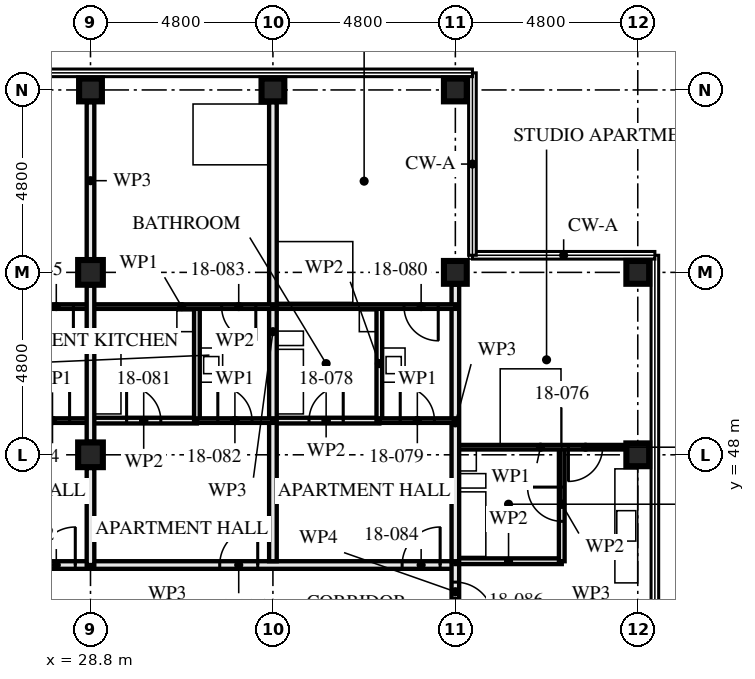
"""IFC4 building model, lengths in metres.
Left out: names, types, materials, properties, quantities, classifications, styles, units other than length and angle.
Written with IfcOpenShell. Run it as: python <this file> out.ifc"""

import sys

from ifc_helpers import new_model, si_unit, direction, frame, frame_2d, origin, origin_2d, place, context, subcontext, project, spatial, rectangle, hollow_rectangle, extrude, element, fill, save


model = new_model("IFC4")
c1 = context("Model", 3, precision=1e-05, world=origin(), true_north=direction((0.0, 1.0)))
c2 = subcontext(c1, "Body", "Model", "MODEL_VIEW")
j1 = project(units=[si_unit("LENGTHUNIT", "METRE"), si_unit("PLANEANGLEUNIT", "RADIAN")], contexts=[c1])
p1 = place(None, origin())
s1 = spatial("IfcSite", under=j1, at=p1, CompositionType="ELEMENT")
p2 = place(p1, origin())
s2 = spatial("IfcBuilding", under=s1, at=p2, CompositionType="ELEMENT")
p3 = place(p2, frame((0.0, 0.0, 69.0)))
s3 = spatial("IfcBuildingStorey", under=s2, at=p3, CompositionType="ELEMENT", Elevation=69.0)
for number, where, z_axis, x_axis in (
    (1, (28.8, 48.0, 0.0), (0.0, 0.0, 1.0), (1.0, 0.0, 0.0)),
    (2, (28.8, 52.8, 0.0), (0.0, 0.0, 1.0), (1.0, 0.0, 0.0)),
):
    element("IfcColumn", number, at=place(p3, frame(where, z_axis=z_axis, x_axis=x_axis)), inside=s3, PredefinedType="COLUMN", context=c2, shape_type="SweptSolid", body=[
        extrude(hollow_rectangle(XDim=0.65, YDim=0.65, WallThickness=0.05, at=origin_2d()), origin(), (0.0, 0.0, 1.0), 3.5),
    ])
for number, where, z_axis, x_axis in (
    (3, (28.8, 57.6, 0.0), (0.0, 0.0, 1.0), (0.0, 1.0, 0.0)),
    (4, (33.6, 57.6, 0.0), (0.0, 0.0, 1.0), (0.0, 1.0, 0.0)),
    (5, (38.4, 52.8, 0.0), (0.0, 0.0, 1.0), (0.0, 1.0, 0.0)),
    (6, (38.4, 57.6, 0.0), (0.0, 0.0, 1.0), (0.0, 1.0, 0.0)),
    (7, (43.2, 48.0, 0.0), (0.0, 0.0, 1.0), (1.0, 0.0, 0.0)),
    (8, (43.2, 52.8, 0.0), (0.0, 0.0, 1.0), (0.0, 1.0, 0.0)),
):
    element("IfcColumn", number, at=place(p3, frame(where, z_axis=z_axis, x_axis=x_axis)), inside=s3, PredefinedType="COLUMN", context=c2, shape_type="SweptSolid", body=[
        extrude(hollow_rectangle(XDim=0.6, YDim=0.6, WallThickness=0.08, at=origin_2d()), origin(), (0.0, 0.0, 1.0), 3.5),
    ])
p4 = place(p3, frame((28.8, 48.9, 0.0), z_axis=(0.0, 0.0, 1.0), x_axis=(-1.0, 0.0, 0.0)))
e9 = element("IfcWall", 9, at=p4, inside=s3, PredefinedType="PARTITIONING", context=c2, shape_type="SweptSolid", body=[
    extrude(rectangle(XDim=2.0, YDim=0.12, at=frame_2d((1.0, 0.0))), origin(), (0.0, 0.0, 1.0), 3.33),
])
p5 = place(p4, frame((0.55, 0.0, 0.0)))
e10 = element("IfcOpeningElement", 10, at=p5, cuts=e9, PredefinedType="OPENING", context=c2, shape_type="SweptSolid", body=[
    extrude(rectangle(XDim=0.9, YDim=2.1, at=frame_2d((0.45, 1.05))), frame((0.0, 0.071, 0.0), z_axis=(0.0, -1.0, 0.0), x_axis=(1.0, 0.0, 0.0)), (0.0, 0.0, 1.0), 0.141),
])
p6 = place(p3, frame((28.8, 51.9, 0.0), z_axis=(0.0, 0.0, 1.0), x_axis=(-1.0, 0.0, 0.0)))
e11 = element("IfcWall", 11, at=p6, inside=s3, PredefinedType="PARTITIONING", context=c2, shape_type="SweptSolid", body=[
    extrude(rectangle(XDim=4.8, YDim=0.12, at=frame_2d((2.4, 0.0))), origin(), (0.0, 0.0, 1.0), 3.33),
])
p7 = place(p6, frame((0.45, 0.0, 0.0)))
e12 = element("IfcOpeningElement", 12, at=p7, cuts=e11, PredefinedType="OPENING", context=c2, shape_type="SweptSolid", body=[
    extrude(rectangle(XDim=0.9, YDim=2.1, at=frame_2d((0.45, 1.05))), frame((0.0, 0.071, 0.0), z_axis=(0.0, -1.0, 0.0), x_axis=(1.0, 0.0, 0.0)), (0.0, 0.0, 1.0), 0.141),
])
p8 = place(p3, frame((28.8, 45.1, 0.0), z_axis=(0.0, 0.0, 1.0), x_axis=(-1.0, 0.0, 0.0)))
e13 = element("IfcWall", 13, at=p8, inside=s3, PredefinedType="PARTITIONING", context=c2, shape_type="SweptSolid", body=[
    extrude(rectangle(XDim=14.4, YDim=0.2, at=frame_2d((7.2, 0.0))), origin(), (0.0, 0.0, 1.0), 3.33),
])
p9 = place(p8, frame((0.4, 0.0, 0.0)))
e14 = element("IfcOpeningElement", 14, at=p9, cuts=e13, PredefinedType="OPENING", context=c2, shape_type="SweptSolid", body=[
    extrude(rectangle(XDim=1.0, YDim=2.1, at=frame_2d((0.5, 1.05))), frame((0.0, 0.111, 0.0), z_axis=(0.0, -1.0, 0.0), x_axis=(1.0, 0.0, 0.0)), (0.0, 0.0, 1.0), 0.221),
])
p10 = place(p8, frame((5.2, 0.0, 0.0)))
e15 = element("IfcOpeningElement", 15, at=p10, cuts=e13, PredefinedType="OPENING", context=c2, shape_type="SweptSolid", body=[
    extrude(rectangle(XDim=1.0, YDim=2.1, at=frame_2d((0.5, 1.05))), frame((0.0, 0.111, 0.0), z_axis=(0.0, -1.0, 0.0), x_axis=(1.0, 0.0, 0.0)), (0.0, 0.0, 1.0), 0.221),
])
p11 = place(p8, frame((10.0, 0.0, 0.0)))
e16 = element("IfcOpeningElement", 16, at=p11, cuts=e13, PredefinedType="OPENING", context=c2, shape_type="SweptSolid", body=[
    extrude(rectangle(XDim=1.0, YDim=2.1, at=frame_2d((0.5, 1.05))), frame((0.0, 0.111, 0.0), z_axis=(0.0, -1.0, 0.0), x_axis=(1.0, 0.0, 0.0)), (0.0, 0.0, 1.0), 0.221),
])
p12 = place(p3, frame((41.2, 48.2, 0.0), z_axis=(0.0, 0.0, 1.0), x_axis=(0.0, -1.0, 0.0)))
e17 = element("IfcWall", 17, at=p12, inside=s3, PredefinedType="PARTITIONING", context=c2, shape_type="SweptSolid", body=[
    extrude(rectangle(XDim=3.0, YDim=0.15, at=frame_2d((1.5, 0.0))), origin(), (0.0, 0.0, 1.0), 2.55),
])
p13 = place(p12, frame((1.05, 0.0, 0.0)))
e18 = element("IfcOpeningElement", 18, at=p13, cuts=e17, PredefinedType="OPENING", context=c2, shape_type="SweptSolid", body=[
    extrude(rectangle(XDim=0.9, YDim=2.1, at=frame_2d((0.45, 1.05))), frame((0.0, 0.085, 0.0), z_axis=(0.0, -1.0, 0.0), x_axis=(1.0, 0.0, 0.0)), (0.0, 0.0, 1.0), 0.171),
])
p14 = place(p3, frame((41.2, 45.2, 0.0), z_axis=(0.0, 0.0, 1.0), x_axis=(-1.0, 0.0, 0.0)))
e19 = element("IfcWall", 19, at=p14, inside=s3, PredefinedType="PARTITIONING", context=c2, shape_type="SweptSolid", body=[
    extrude(rectangle(XDim=2.8, YDim=0.15, at=frame_2d((1.4, 0.0))), origin(), (0.0, 0.0, 1.0), 3.33),
])
p15 = place(p3, frame((42.88, 48.2, 0.0), z_axis=(0.0, 0.0, 1.0), x_axis=(-1.0, 0.0, 0.0)))
e20 = element("IfcWall", 20, at=p15, inside=s3, PredefinedType="PARTITIONING", context=c2, shape_type="SweptSolid", body=[
    extrude(rectangle(XDim=4.48, YDim=0.12, at=frame_2d((2.24, 0.0))), origin(), (0.0, 0.0, 1.0), 3.33),
])
p16 = place(p15, frame((0.605, 0.0, 0.0)))
e21 = element("IfcOpeningElement", 21, at=p16, cuts=e20, PredefinedType="OPENING", context=c2, shape_type="SweptSolid", body=[
    extrude(rectangle(XDim=0.9, YDim=2.1, at=frame_2d((0.45, 1.05))), frame((0.0, 0.071, 0.0), z_axis=(0.0, -1.0, 0.0), x_axis=(1.0, 0.0, 0.0)), (0.0, 0.0, 1.0), 0.141),
])
p17 = place(p3, frame((38.4, 52.48, 0.0), z_axis=(0.0, 0.0, 1.0), x_axis=(0.0, -1.0, 0.0)))
e22 = element("IfcWall", 22, at=p17, inside=s3, PredefinedType="PARTITIONING", context=c2, shape_type="SweptSolid", body=[
    extrude(rectangle(XDim=7.28, YDim=0.2, at=frame_2d((3.64, 0.0))), origin(), (0.0, 0.0, 1.0), 2.55),
])
p18 = place(p3, frame((36.4, 51.9, 0.0), z_axis=(0.0, 0.0, 1.0), x_axis=(0.0, -1.0, 0.0)))
e23 = element("IfcWall", 23, at=p18, inside=s3, PredefinedType="PARTITIONING", context=c2, shape_type="SweptSolid", body=[
    extrude(rectangle(XDim=3.0, YDim=0.15, at=frame_2d((1.5, 0.0))), origin(), (0.0, 0.0, 1.0), 3.33),
])
p19 = place(p3, frame((36.4, 48.9, 0.0), z_axis=(0.0, 0.0, 1.0), x_axis=(-1.0, 0.0, 0.0)))
e24 = element("IfcWall", 24, at=p19, inside=s3, PredefinedType="PARTITIONING", context=c2, shape_type="SweptSolid", body=[
    extrude(rectangle(XDim=2.8, YDim=0.15, at=frame_2d((1.4, 0.0))), origin(), (0.0, 0.0, 1.0), 3.33),
])
p20 = place(p19, frame((0.95, 0.0, 0.0)))
e25 = element("IfcOpeningElement", 25, at=p20, cuts=e24, PredefinedType="OPENING", context=c2, shape_type="SweptSolid", body=[
    extrude(rectangle(XDim=0.9, YDim=2.1, at=frame_2d((0.45, 1.05))), frame((0.0, 0.085, 0.0), z_axis=(0.0, -1.0, 0.0), x_axis=(1.0, 0.0, 0.0)), (0.0, 0.0, 1.0), 0.171),
])
p21 = place(p3, frame((38.4, 48.9, 0.0), z_axis=(0.0, 0.0, 1.0), x_axis=(-1.0, 0.0, 0.0)))
e26 = element("IfcWall", 26, at=p21, inside=s3, PredefinedType="PARTITIONING", context=c2, shape_type="SweptSolid", body=[
    extrude(rectangle(XDim=2.0, YDim=0.12, at=frame_2d((1.0, 0.0))), origin(), (0.0, 0.0, 1.0), 3.33),
])
p22 = place(p21, frame((0.55, 0.0, 0.0)))
e27 = element("IfcOpeningElement", 27, at=p22, cuts=e26, PredefinedType="OPENING", context=c2, shape_type="SweptSolid", body=[
    extrude(rectangle(XDim=0.9, YDim=2.1, at=frame_2d((0.45, 1.05))), frame((0.0, 0.071, 0.0), z_axis=(0.0, -1.0, 0.0), x_axis=(1.0, 0.0, 0.0)), (0.0, 0.0, 1.0), 0.141),
])
p23 = place(p3, frame((38.4, 51.9, 0.0), z_axis=(0.0, 0.0, 1.0), x_axis=(-1.0, 0.0, 0.0)))
e28 = element("IfcWall", 28, at=p23, inside=s3, PredefinedType="PARTITIONING", context=c2, shape_type="SweptSolid", body=[
    extrude(rectangle(XDim=4.8, YDim=0.12, at=frame_2d((2.4, 0.0))), origin(), (0.0, 0.0, 1.0), 3.33),
])
p24 = place(p23, frame((0.45, 0.0, 0.0)))
e29 = element("IfcOpeningElement", 29, at=p24, cuts=e28, PredefinedType="OPENING", context=c2, shape_type="SweptSolid", body=[
    extrude(rectangle(XDim=0.9, YDim=2.1, at=frame_2d((0.45, 1.05))), frame((0.0, 0.071, 0.0), z_axis=(0.0, -1.0, 0.0), x_axis=(1.0, 0.0, 0.0)), (0.0, 0.0, 1.0), 0.141),
])
p25 = place(p3, frame((33.6, 57.28, 0.0), z_axis=(0.0, 0.0, 1.0), x_axis=(0.0, -1.0, 0.0)))
e30 = element("IfcWall", 30, at=p25, inside=s3, PredefinedType="PARTITIONING", context=c2, shape_type="SweptSolid", body=[
    extrude(rectangle(XDim=12.08, YDim=0.2, at=frame_2d((6.04, 0.0))), origin(), (0.0, 0.0, 1.0), 2.55),
])
p26 = place(p3, frame((31.6, 51.9, 0.0), z_axis=(0.0, 0.0, 1.0), x_axis=(0.0, -1.0, 0.0)))
e31 = element("IfcWall", 31, at=p26, inside=s3, PredefinedType="PARTITIONING", context=c2, shape_type="SweptSolid", body=[
    extrude(rectangle(XDim=3.0, YDim=0.15, at=frame_2d((1.5, 0.0))), origin(), (0.0, 0.0, 1.0), 3.33),
])
p27 = place(p3, frame((31.6, 48.9, 0.0), z_axis=(0.0, 0.0, 1.0), x_axis=(-1.0, 0.0, 0.0)))
e32 = element("IfcWall", 32, at=p27, inside=s3, PredefinedType="PARTITIONING", context=c2, shape_type="SweptSolid", body=[
    extrude(rectangle(XDim=2.8, YDim=0.15, at=frame_2d((1.4, 0.0))), origin(), (0.0, 0.0, 1.0), 3.33),
])
p28 = place(p27, frame((0.95, 0.0, 0.0)))
e33 = element("IfcOpeningElement", 33, at=p28, cuts=e32, PredefinedType="OPENING", context=c2, shape_type="SweptSolid", body=[
    extrude(rectangle(XDim=0.9, YDim=2.1, at=frame_2d((0.45, 1.05))), frame((0.0, 0.085, 0.0), z_axis=(0.0, -1.0, 0.0), x_axis=(1.0, 0.0, 0.0)), (0.0, 0.0, 1.0), 0.171),
])
p29 = place(p3, frame((33.6, 48.9, 0.0), z_axis=(0.0, 0.0, 1.0), x_axis=(-1.0, 0.0, 0.0)))
e34 = element("IfcWall", 34, at=p29, inside=s3, PredefinedType="PARTITIONING", context=c2, shape_type="SweptSolid", body=[
    extrude(rectangle(XDim=2.0, YDim=0.12, at=frame_2d((1.0, 0.0))), origin(), (0.0, 0.0, 1.0), 3.33),
])
p30 = place(p29, frame((0.55, 0.0, 0.0)))
e35 = element("IfcOpeningElement", 35, at=p30, cuts=e34, PredefinedType="OPENING", context=c2, shape_type="SweptSolid", body=[
    extrude(rectangle(XDim=0.9, YDim=2.1, at=frame_2d((0.45, 1.05))), frame((0.0, 0.071, 0.0), z_axis=(0.0, -1.0, 0.0), x_axis=(1.0, 0.0, 0.0)), (0.0, 0.0, 1.0), 0.141),
])
p31 = place(p3, frame((33.6, 51.9, 0.0), z_axis=(0.0, 0.0, 1.0), x_axis=(-1.0, 0.0, 0.0)))
e36 = element("IfcWall", 36, at=p31, inside=s3, PredefinedType="PARTITIONING", context=c2, shape_type="SweptSolid", body=[
    extrude(rectangle(XDim=4.8, YDim=0.12, at=frame_2d((2.4, 0.0))), origin(), (0.0, 0.0, 1.0), 3.33),
])
p32 = place(p31, frame((0.45, 0.0, 0.0)))
e37 = element("IfcOpeningElement", 37, at=p32, cuts=e36, PredefinedType="OPENING", context=c2, shape_type="SweptSolid", body=[
    extrude(rectangle(XDim=0.9, YDim=2.1, at=frame_2d((0.45, 1.05))), frame((0.0, 0.071, 0.0), z_axis=(0.0, -1.0, 0.0), x_axis=(1.0, 0.0, 0.0)), (0.0, 0.0, 1.0), 0.141),
])
p33 = place(p3, frame((38.4, 45.1, 0.0), z_axis=(0.0, 0.0, 1.0), x_axis=(-1.0, 0.0, 0.0)))
e38 = element("IfcWall", 38, at=p33, inside=s3, PredefinedType="PARTITIONING", context=c2, shape_type="SweptSolid", body=[
    extrude(rectangle(XDim=9.6, YDim=0.2, at=frame_2d((4.8, 0.0))), origin(), (0.0, 0.0, 1.0), 3.33),
])
p34 = place(p33, frame((0.4, 0.0, 0.0)))
e39 = element("IfcOpeningElement", 39, at=p34, cuts=e38, PredefinedType="OPENING", context=c2, shape_type="SweptSolid", body=[
    extrude(rectangle(XDim=1.0, YDim=2.1, at=frame_2d((0.5, 1.05))), frame((0.0, 0.111, 0.0), z_axis=(0.0, -1.0, 0.0), x_axis=(1.0, 0.0, 0.0)), (0.0, 0.0, 1.0), 0.221),
])
p35 = place(p33, frame((5.2, 0.0, 0.0)))
e40 = element("IfcOpeningElement", 40, at=p35, cuts=e38, PredefinedType="OPENING", context=c2, shape_type="SweptSolid", body=[
    extrude(rectangle(XDim=1.0, YDim=2.1, at=frame_2d((0.5, 1.05))), frame((0.0, 0.111, 0.0), z_axis=(0.0, -1.0, 0.0), x_axis=(1.0, 0.0, 0.0)), (0.0, 0.0, 1.0), 0.221),
])
p36 = place(p3, frame((38.4, 45.2, 0.0), z_axis=(0.0, 0.0, 1.0), x_axis=(0.0, -1.0, 0.0)))
e41 = element("IfcWall", 41, at=p36, inside=s3, PredefinedType="PARTITIONING", context=c2, shape_type="SweptSolid", body=[
    extrude(rectangle(XDim=1.605, YDim=0.2, at=frame_2d((0.802, 0.0))), origin(), (0.0, 0.0, 1.0), 3.33),
])
p37 = place(p36, frame((0.55, 0.0, 0.0)))
e42 = element("IfcOpeningElement", 42, at=p37, cuts=e41, PredefinedType="OPENING", context=c2, shape_type="SweptSolid", body=[
    extrude(rectangle(XDim=1.0, YDim=2.1, at=frame_2d((0.5, 1.05))), frame((0.0, 0.111, 0.0), z_axis=(0.0, -1.0, 0.0), x_axis=(1.0, 0.0, 0.0)), (0.0, 0.0, 1.0), 0.221),
])
p38 = place(p3, frame((28.8, 45.1, 0.0), z_axis=(0.0, 0.0, 1.0), x_axis=(0.0, 1.0, 0.0)))
e43 = element("IfcWall", 43, at=p38, inside=s3, PredefinedType="PARTITIONING", context=c2, shape_type="SweptSolid", body=[
    extrude(rectangle(XDim=2.555, YDim=0.2, at=frame_2d((1.277, 0.0))), origin(), (0.0, 0.0, 1.0), 2.32),
])
p39 = place(p3, frame((28.8, 48.345, 0.0), z_axis=(0.0, 0.0, 1.0), x_axis=(0.0, 1.0, 0.0)))
e44 = element("IfcWall", 44, at=p39, inside=s3, PredefinedType="PARTITIONING", context=c2, shape_type="SweptSolid", body=[
    extrude(rectangle(XDim=4.11, YDim=0.2, at=frame_2d((2.055, 0.0))), origin(), (0.0, 0.0, 1.0), 2.32),
])
p40 = place(p3, frame((28.8, 53.145, 0.0), z_axis=(0.0, 0.0, 1.0), x_axis=(0.0, 1.0, 0.0)))
e45 = element("IfcWall", 45, at=p40, inside=s3, PredefinedType="PARTITIONING", context=c2, shape_type="SweptSolid", body=[
    extrude(rectangle(XDim=4.135, YDim=0.2, at=frame_2d((2.067, 0.0))), origin(), (0.0, 0.0, 1.0), 2.32),
])
p41 = place(p5, frame((0.9, 0.0, 0.0), z_axis=(0.0, 0.0, 1.0), x_axis=(-1.0, 0.0, 0.0)))
e46 = element("IfcDoor", 46, at=p41, inside=s3, OperationType="SINGLE_SWING_LEFT", PredefinedType="DOOR", context=c2, shape_type="SweptSolid", body=[
    extrude(rectangle(XDim=0.9, YDim=2.1, at=frame_2d((0.45, 1.05))), frame((0.0, 0.022, 0.0), z_axis=(0.0, -1.0, 0.0), x_axis=(1.0, 0.0, 0.0)), (0.0, 0.0, 1.0), 0.044),
])
fill(e10, e46)
p42 = place(p7, origin())
e47 = element("IfcDoor", 47, at=p42, inside=s3, OperationType="SINGLE_SWING_RIGHT", PredefinedType="DOOR", context=c2, shape_type="SweptSolid", body=[
    extrude(rectangle(XDim=0.9, YDim=2.1, at=frame_2d((0.45, 1.05))), frame((0.0, 0.022, 0.0), z_axis=(0.0, -1.0, 0.0), x_axis=(1.0, 0.0, 0.0)), (0.0, 0.0, 1.0), 0.044),
])
fill(e12, e47)
p43 = place(p9, frame((1.0, 0.0, 0.0), z_axis=(0.0, 0.0, 1.0), x_axis=(-1.0, 0.0, 0.0)))
e48 = element("IfcDoor", 48, at=p43, inside=s3, OperationType="SINGLE_SWING_LEFT", PredefinedType="DOOR", context=c2, shape_type="SweptSolid", body=[
    extrude(rectangle(XDim=1.0, YDim=2.1, at=frame_2d((0.5, 1.05))), frame((0.0, 0.027, 0.0), z_axis=(0.0, -1.0, 0.0), x_axis=(1.0, 0.0, 0.0)), (0.0, 0.0, 1.0), 0.054),
])
fill(e14, e48)
p44 = place(p13, frame((0.9, 0.0, 0.0), z_axis=(0.0, 0.0, 1.0), x_axis=(-1.0, 0.0, 0.0)))
e49 = element("IfcDoor", 49, at=p44, inside=s3, OperationType="SINGLE_SWING_LEFT", PredefinedType="DOOR", context=c2, shape_type="SweptSolid", body=[
    extrude(rectangle(XDim=0.9, YDim=2.1, at=frame_2d((0.45, 1.05))), frame((0.0, 0.022, 0.0), z_axis=(0.0, -1.0, 0.0), x_axis=(1.0, 0.0, 0.0)), (0.0, 0.0, 1.0), 0.044),
])
fill(e18, e49)
p45 = place(p16, origin())
e50 = element("IfcDoor", 50, at=p45, inside=s3, OperationType="SINGLE_SWING_LEFT", PredefinedType="DOOR", context=c2, shape_type="SweptSolid", body=[
    extrude(rectangle(XDim=0.9, YDim=2.1, at=frame_2d((0.45, 1.05))), frame((0.0, 0.022, 0.0), z_axis=(0.0, -1.0, 0.0), x_axis=(1.0, 0.0, 0.0)), (0.0, 0.0, 1.0), 0.044),
])
fill(e21, e50)
p46 = place(p20, frame((0.9, 0.0, 0.0), z_axis=(0.0, 0.0, 1.0), x_axis=(-1.0, 0.0, 0.0)))
e51 = element("IfcDoor", 51, at=p46, inside=s3, OperationType="SINGLE_SWING_LEFT", PredefinedType="DOOR", context=c2, shape_type="SweptSolid", body=[
    extrude(rectangle(XDim=0.9, YDim=2.1, at=frame_2d((0.45, 1.05))), frame((0.0, 0.022, 0.0), z_axis=(0.0, -1.0, 0.0), x_axis=(1.0, 0.0, 0.0)), (0.0, 0.0, 1.0), 0.044),
])
fill(e25, e51)
p47 = place(p22, frame((0.9, 0.0, 0.0), z_axis=(0.0, 0.0, 1.0), x_axis=(-1.0, 0.0, 0.0)))
e52 = element("IfcDoor", 52, at=p47, inside=s3, OperationType="SINGLE_SWING_RIGHT", PredefinedType="DOOR", context=c2, shape_type="SweptSolid", body=[
    extrude(rectangle(XDim=0.9, YDim=2.1, at=frame_2d((0.45, 1.05))), frame((0.0, 0.022, 0.0), z_axis=(0.0, -1.0, 0.0), x_axis=(1.0, 0.0, 0.0)), (0.0, 0.0, 1.0), 0.044),
])
fill(e27, e52)
p48 = place(p24, origin())
e53 = element("IfcDoor", 53, at=p48, inside=s3, OperationType="SINGLE_SWING_RIGHT", PredefinedType="DOOR", context=c2, shape_type="SweptSolid", body=[
    extrude(rectangle(XDim=0.9, YDim=2.1, at=frame_2d((0.45, 1.05))), frame((0.0, 0.022, 0.0), z_axis=(0.0, -1.0, 0.0), x_axis=(1.0, 0.0, 0.0)), (0.0, 0.0, 1.0), 0.044),
])
fill(e29, e53)
p49 = place(p28, frame((0.9, 0.0, 0.0), z_axis=(0.0, 0.0, 1.0), x_axis=(-1.0, 0.0, 0.0)))
e54 = element("IfcDoor", 54, at=p49, inside=s3, OperationType="SINGLE_SWING_RIGHT", PredefinedType="DOOR", context=c2, shape_type="SweptSolid", body=[
    extrude(rectangle(XDim=0.9, YDim=2.1, at=frame_2d((0.45, 1.05))), frame((0.0, 0.022, 0.0), z_axis=(0.0, -1.0, 0.0), x_axis=(1.0, 0.0, 0.0)), (0.0, 0.0, 1.0), 0.044),
])
fill(e33, e54)
p50 = place(p30, frame((0.9, 0.0, 0.0), z_axis=(0.0, 0.0, 1.0), x_axis=(-1.0, 0.0, 0.0)))
e55 = element("IfcDoor", 55, at=p50, inside=s3, OperationType="SINGLE_SWING_RIGHT", PredefinedType="DOOR", context=c2, shape_type="SweptSolid", body=[
    extrude(rectangle(XDim=0.9, YDim=2.1, at=frame_2d((0.45, 1.05))), frame((0.0, 0.022, 0.0), z_axis=(0.0, -1.0, 0.0), x_axis=(1.0, 0.0, 0.0)), (0.0, 0.0, 1.0), 0.044),
])
fill(e35, e55)
p51 = place(p32, origin())
e56 = element("IfcDoor", 56, at=p51, inside=s3, OperationType="SINGLE_SWING_RIGHT", PredefinedType="DOOR", context=c2, shape_type="SweptSolid", body=[
    extrude(rectangle(XDim=0.9, YDim=2.1, at=frame_2d((0.45, 1.05))), frame((0.0, 0.022, 0.0), z_axis=(0.0, -1.0, 0.0), x_axis=(1.0, 0.0, 0.0)), (0.0, 0.0, 1.0), 0.044),
])
fill(e37, e56)
p52 = place(p34, frame((1.0, 0.0, 0.0), z_axis=(0.0, 0.0, 1.0), x_axis=(-1.0, 0.0, 0.0)))
e57 = element("IfcDoor", 57, at=p52, inside=s3, OperationType="SINGLE_SWING_LEFT", PredefinedType="DOOR", context=c2, shape_type="SweptSolid", body=[
    extrude(rectangle(XDim=1.0, YDim=2.1, at=frame_2d((0.5, 1.05))), frame((0.0, 0.027, 0.0), z_axis=(0.0, -1.0, 0.0), x_axis=(1.0, 0.0, 0.0)), (0.0, 0.0, 1.0), 0.054),
])
fill(e39, e57)
p53 = place(p35, frame((1.0, 0.0, 0.0), z_axis=(0.0, 0.0, 1.0), x_axis=(-1.0, 0.0, 0.0)))
e58 = element("IfcDoor", 58, at=p53, inside=s3, OperationType="SINGLE_SWING_LEFT", PredefinedType="DOOR", context=c2, shape_type="SweptSolid", body=[
    extrude(rectangle(XDim=1.0, YDim=2.1, at=frame_2d((0.5, 1.05))), frame((0.0, 0.027, 0.0), z_axis=(0.0, -1.0, 0.0), x_axis=(1.0, 0.0, 0.0)), (0.0, 0.0, 1.0), 0.054),
])
fill(e40, e58)
p54 = place(p37, origin())
e59 = element("IfcDoor", 59, at=p54, inside=s3, OperationType="SINGLE_SWING_LEFT", PredefinedType="DOOR", context=c2, shape_type="SweptSolid", body=[
    extrude(rectangle(XDim=1.0, YDim=2.1, at=frame_2d((0.5, 1.05))), frame((0.0, 0.027, 0.0), z_axis=(0.0, -1.0, 0.0), x_axis=(1.0, 0.0, 0.0)), (0.0, 0.0, 1.0), 0.054),
])
fill(e42, e59)
save(model, sys.argv[1])
